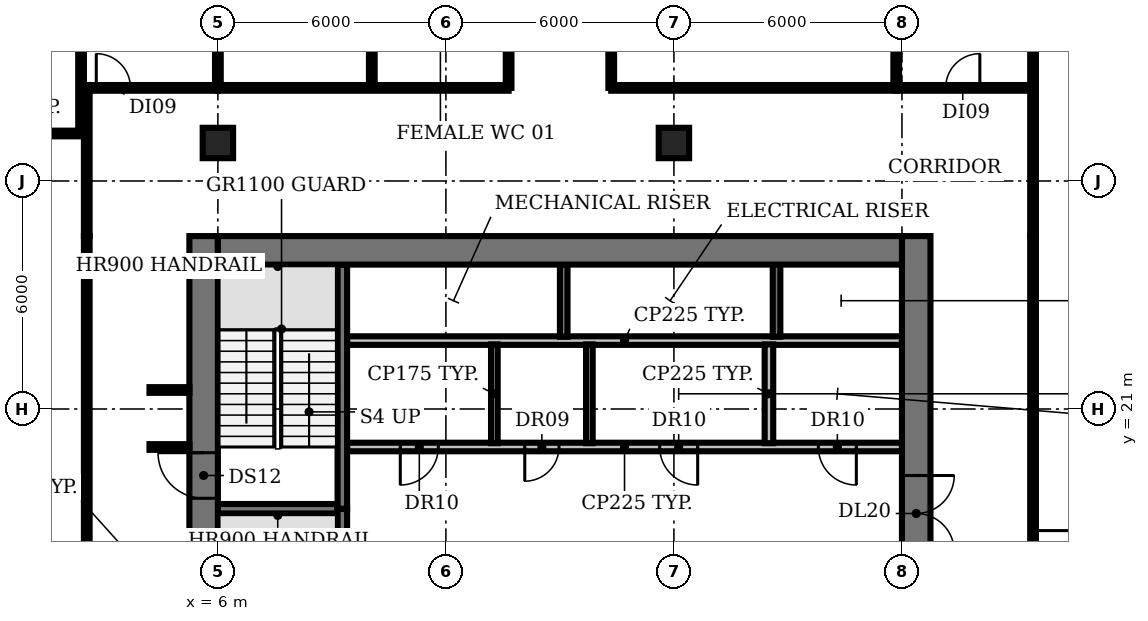
"""IFC4 building model, lengths in metres.
Left out: names, types, materials, properties, quantities, classifications, styles, units other than length and angle.
Written with IfcOpenShell. Run it as: python <this file> out.ifc"""

import sys

from ifc_helpers import new_model, si_unit, direction, frame, frame_2d, origin, origin_2d, place, context, subcontext, project, spatial, rectangle, extrude, element, fill, save


model = new_model("IFC4")
c1 = context("Model", 3, precision=1e-05, world=origin(), true_north=direction((0.0, 1.0)))
c2 = subcontext(c1, "Body", "Model", "MODEL_VIEW")
j1 = project(units=[si_unit("LENGTHUNIT", "METRE"), si_unit("PLANEANGLEUNIT", "RADIAN")], contexts=[c1])
p1 = place(None, origin())
s1 = spatial("IfcSite", under=j1, at=p1, CompositionType="ELEMENT")
p2 = place(p1, origin())
s2 = spatial("IfcBuilding", under=s1, at=p2, CompositionType="ELEMENT")
p3 = place(p2, frame((0.0, 0.0, 121.4)))
s3 = spatial("IfcBuildingStorey", under=s2, at=p3, CompositionType="ELEMENT", Elevation=121.4)
for number, where, z_axis, x_axis in (
    (1, (6.0, 28.0, 0.0), (0.0, 0.0, 1.0), (1.0, 0.0, 0.0)),
    (2, (18.0, 28.0, 0.0), (0.0, 0.0, 1.0), (1.0, 0.0, 0.0)),
):
    element("IfcColumn", number, at=place(p3, frame(where, z_axis=z_axis, x_axis=x_axis)), inside=s3, PredefinedType="COLUMN", context=c2, shape_type="SweptSolid", body=[
        extrude(rectangle(XDim=0.8, YDim=0.8, at=origin_2d()), origin(), (0.0, 0.0, 1.0), 3.85),
    ])
p4 = place(p3, frame((6.0, 18.375, 0.0), z_axis=(0.0, 0.0, 1.0), x_axis=(1.0, 0.0, 0.0)))
e3 = element("IfcWall", 3, at=p4, inside=s3, PredefinedType="SHEAR", context=c2, shape_type="SweptSolid", body=[
    extrude(rectangle(XDim=3.15, YDim=0.25, at=frame_2d((1.575, 0.0))), origin(), (0.0, 0.0, 1.0), 3.85),
])
p5 = place(p3, frame((24.0, 20.0, 0.0), z_axis=(0.0, 0.0, 1.0), x_axis=(-1.0, 0.0, 0.0)))
e4 = element("IfcWall", 4, at=p5, inside=s3, PredefinedType="PARTITIONING", context=c2, shape_type="SweptSolid", body=[
    extrude(rectangle(XDim=14.6, YDim=0.225, at=frame_2d((7.3, 0.0))), origin(), (0.0, 0.0, 1.0), 3.85),
])
p6 = place(p5, frame((12.2, 0.0, 0.0)))
e5 = element("IfcOpeningElement", 5, at=p6, cuts=e4, PredefinedType="OPENING", context=c2, shape_type="SweptSolid", body=[
    extrude(rectangle(XDim=1.0, YDim=2.1, at=frame_2d((0.5, 1.05))), frame((0.0, 0.123, 0.0), z_axis=(0.0, -1.0, 0.0), x_axis=(1.0, 0.0, 0.0)), (0.0, 0.0, 1.0), 0.245),
])
p7 = place(p5, frame((9.025, 0.0, 0.0)))
e6 = element("IfcOpeningElement", 6, at=p7, cuts=e4, PredefinedType="OPENING", context=c2, shape_type="SweptSolid", body=[
    extrude(rectangle(XDim=0.9, YDim=2.1, at=frame_2d((0.45, 1.05))), frame((0.0, 0.123, 0.0), z_axis=(0.0, -1.0, 0.0), x_axis=(1.0, 0.0, 0.0)), (0.0, 0.0, 1.0), 0.245),
])
p8 = place(p5, frame((5.375, 0.0, 0.0)))
e7 = element("IfcOpeningElement", 7, at=p8, cuts=e4, PredefinedType="OPENING", context=c2, shape_type="SweptSolid", body=[
    extrude(rectangle(XDim=1.0, YDim=2.1, at=frame_2d((0.5, 1.05))), frame((0.0, 0.123, 0.0), z_axis=(0.0, -1.0, 0.0), x_axis=(1.0, 0.0, 0.0)), (0.0, 0.0, 1.0), 0.245),
])
p9 = place(p5, frame((1.2, 0.0, 0.0)))
e8 = element("IfcOpeningElement", 8, at=p9, cuts=e4, PredefinedType="OPENING", context=c2, shape_type="SweptSolid", body=[
    extrude(rectangle(XDim=1.0, YDim=2.1, at=frame_2d((0.5, 1.05))), frame((0.0, 0.123, 0.0), z_axis=(0.0, -1.0, 0.0), x_axis=(1.0, 0.0, 0.0)), (0.0, 0.0, 1.0), 0.245),
])
p10 = place(p3, frame((9.4, 22.8, 0.0), z_axis=(0.0, 0.0, 1.0), x_axis=(1.0, 0.0, 0.0)))
e9 = element("IfcWall", 9, at=p10, inside=s3, PredefinedType="PARTITIONING", context=c2, shape_type="SweptSolid", body=[
    extrude(rectangle(XDim=14.6, YDim=0.225, at=frame_2d((7.3, 0.0))), origin(), (0.0, 0.0, 1.0), 3.85),
])
p11 = place(p3, frame((9.275, 18.375, 0.0), z_axis=(0.0, 0.0, 1.0), x_axis=(0.0, -1.0, 0.0)))
e10 = element("IfcWall", 10, at=p11, inside=s3, PredefinedType="SHEAR", context=c2, shape_type="SweptSolid", body=[
    extrude(rectangle(XDim=6.55, YDim=0.25, at=frame_2d((3.275, 0.0))), origin(), (0.0, 0.0, 1.0), 3.85),
])
p12 = place(p11, frame((5.075, 0.0, 0.0)))
e11 = element("IfcOpeningElement", 11, at=p12, cuts=e10, PredefinedType="OPENING", context=c2, shape_type="SweptSolid", body=[
    extrude(rectangle(XDim=1.0, YDim=2.1, at=frame_2d((0.5, 1.05))), frame((0.0, 0.135, 0.0), z_axis=(0.0, -1.0, 0.0), x_axis=(1.0, 0.0, 0.0)), (0.0, 0.0, 1.0), 0.27),
])
p13 = place(p3, frame((9.275, 18.375, 0.0), z_axis=(0.0, 0.0, 1.0), x_axis=(0.0, 1.0, 0.0)))
e12 = element("IfcWall", 12, at=p13, inside=s3, PredefinedType="SHEAR", context=c2, shape_type="SweptSolid", body=[
    extrude(rectangle(XDim=6.425, YDim=0.25, at=frame_2d((3.212, 0.0))), origin(), (0.0, 0.0, 1.0), 3.85),
])
p14 = place(p3, frame((13.275, 20.1, 0.0), z_axis=(0.0, 0.0, 1.0), x_axis=(0.0, 1.0, 0.0)))
e13 = element("IfcWall", 13, at=p14, inside=s3, PredefinedType="PARTITIONING", context=c2, shape_type="SweptSolid", body=[
    extrude(rectangle(XDim=2.6, YDim=0.175, at=frame_2d((1.3, 0.0))), origin(), (0.0, 0.0, 1.0), 3.85),
])
p15 = place(p3, frame((15.1, 22.9, 0.0), z_axis=(0.0, 0.0, 1.0), x_axis=(0.0, 1.0, 0.0)))
e14 = element("IfcWall", 14, at=p15, inside=s3, PredefinedType="SHEAR", context=c2, shape_type="SweptSolid", body=[
    extrude(rectangle(XDim=1.9, YDim=0.2, at=frame_2d((0.95, 0.0))), origin(), (0.0, 0.0, 1.0), 3.85),
])
p16 = place(p3, frame((15.775, 20.1, 0.0), z_axis=(0.0, 0.0, 1.0), x_axis=(0.0, 1.0, 0.0)))
e15 = element("IfcWall", 15, at=p16, inside=s3, PredefinedType="PARTITIONING", context=c2, shape_type="SweptSolid", body=[
    extrude(rectangle(XDim=2.6, YDim=0.175, at=frame_2d((1.3, 0.0))), origin(), (0.0, 0.0, 1.0), 3.85),
])
p17 = place(p3, frame((20.5, 20.1, 0.0), z_axis=(0.0, 0.0, 1.0), x_axis=(0.0, 1.0, 0.0)))
e16 = element("IfcWall", 16, at=p17, inside=s3, PredefinedType="PARTITIONING", context=c2, shape_type="SweptSolid", body=[
    extrude(rectangle(XDim=2.6, YDim=0.225, at=frame_2d((1.3, 0.0))), origin(), (0.0, 0.0, 1.0), 3.85),
])
p18 = place(p3, frame((20.7, 22.9, 0.0), z_axis=(0.0, 0.0, 1.0), x_axis=(0.0, 1.0, 0.0)))
e17 = element("IfcWall", 17, at=p18, inside=s3, PredefinedType="SHEAR", context=c2, shape_type="SweptSolid", body=[
    extrude(rectangle(XDim=1.9, YDim=0.2, at=frame_2d((0.95, 0.0))), origin(), (0.0, 0.0, 1.0), 3.85),
])
p19 = place(p3, frame((5.625, 4.47, 0.0), z_axis=(0.0, 0.0, 1.0), x_axis=(0.0, 1.0, 0.0)))
e18 = element("IfcWall", 18, at=p19, inside=s3, PredefinedType="SHEAR", context=c2, shape_type="SweptSolid", body=[
    extrude(rectangle(XDim=21.08, YDim=0.75, at=frame_2d((10.54, 0.0))), origin(), (0.0, 0.0, 1.0), 3.85),
])
p20 = place(p19, frame((1.18, 0.0, 0.0)))
e19 = element("IfcOpeningElement", 19, at=p20, cuts=e18, PredefinedType="OPENING", context=c2, shape_type="SweptSolid", body=[
    extrude(rectangle(XDim=1.5, YDim=2.1, at=frame_2d((0.75, 1.05))), frame((0.0, 0.385, 0.0), z_axis=(0.0, -1.0, 0.0), x_axis=(1.0, 0.0, 0.0)), (0.0, 0.0, 1.0), 0.77),
])
p21 = place(p19, frame((7.63, 0.0, 0.0)))
e20 = element("IfcOpeningElement", 20, at=p21, cuts=e18, PredefinedType="OPENING", context=c2, shape_type="SweptSolid", body=[
    extrude(rectangle(XDim=1.2, YDim=2.1, at=frame_2d((0.6, 1.05))), frame((0.0, 0.385, 0.0), z_axis=(0.0, -1.0, 0.0), x_axis=(1.0, 0.0, 0.0)), (0.0, 0.0, 1.0), 0.77),
])
p22 = place(p19, frame((14.18, 0.0, 0.0)))
e21 = element("IfcOpeningElement", 21, at=p22, cuts=e18, PredefinedType="OPENING", context=c2, shape_type="SweptSolid", body=[
    extrude(rectangle(XDim=1.2, YDim=2.1, at=frame_2d((0.6, 1.05))), frame((0.0, 0.385, 0.0), z_axis=(0.0, -1.0, 0.0), x_axis=(1.0, 0.0, 0.0)), (0.0, 0.0, 1.0), 0.77),
])
p23 = place(p3, frame((24.375, 25.55, 0.0), z_axis=(0.0, 0.0, 1.0), x_axis=(0.0, -1.0, 0.0)))
e22 = element("IfcWall", 22, at=p23, inside=s3, PredefinedType="SHEAR", context=c2, shape_type="SweptSolid", body=[
    extrude(rectangle(XDim=21.13, YDim=0.75, at=frame_2d((10.565, 0.0))), origin(), (0.0, 0.0, 1.0), 3.85),
])
p24 = place(p23, frame((18.4, 0.0, 0.0)))
e23 = element("IfcOpeningElement", 23, at=p24, cuts=e22, PredefinedType="OPENING", context=c2, shape_type="SweptSolid", body=[
    extrude(rectangle(XDim=1.5, YDim=2.1, at=frame_2d((0.75, 1.05))), frame((0.0, 0.385, 0.0), z_axis=(0.0, -1.0, 0.0), x_axis=(1.0, 0.0, 0.0)), (0.0, 0.0, 1.0), 0.77),
])
p25 = place(p23, frame((12.3, 0.0, 0.0)))
e24 = element("IfcOpeningElement", 24, at=p25, cuts=e22, PredefinedType="OPENING", context=c2, shape_type="SweptSolid", body=[
    extrude(rectangle(XDim=0.9, YDim=2.1, at=frame_2d((0.45, 1.05))), frame((0.0, 0.385, 0.0), z_axis=(0.0, -1.0, 0.0), x_axis=(1.0, 0.0, 0.0)), (0.0, 0.0, 1.0), 0.77),
])
p26 = place(p23, frame((6.3, 0.0, 0.0)))
e25 = element("IfcOpeningElement", 25, at=p26, cuts=e22, PredefinedType="OPENING", context=c2, shape_type="SweptSolid", body=[
    extrude(rectangle(XDim=2.0, YDim=2.1, at=frame_2d((1.0, 1.05))), frame((0.0, 0.385, 0.0), z_axis=(0.0, -1.0, 0.0), x_axis=(1.0, 0.0, 0.0)), (0.0, 0.0, 1.0), 0.77),
])
p27 = place(p3, frame((6.0, 25.175, 0.0), z_axis=(0.0, 0.0, 1.0), x_axis=(1.0, 0.0, 0.0)))
e26 = element("IfcWall", 26, at=p27, inside=s3, PredefinedType="SHEAR", context=c2, shape_type="SweptSolid", body=[
    extrude(rectangle(XDim=18.0, YDim=0.75, at=frame_2d((9.0, 0.0))), origin(), (0.0, 0.0, 1.0), 3.85),
])
p28 = place(p3, frame((-1.22, 28.25, 0.0), z_axis=(0.0, 0.0, 1.0), x_axis=(1.0, 0.0, 0.0)))
e27 = element("IfcWall", 27, at=p28, inside=s3, PredefinedType="PARTITIONING", context=c2, shape_type="SweptSolid", body=[
    extrude(rectangle(XDim=3.62, YDim=0.15, at=frame_2d((1.81, 0.0))), origin(), (0.0, 0.0, 1.0), 2.83),
])
p29 = place(p3, frame((2.4, 28.25, 0.0), z_axis=(0.0, 0.0, 1.0), x_axis=(0.0, 1.0, 0.0)))
e28 = element("IfcWall", 28, at=p29, inside=s3, PredefinedType="PARTITIONING", context=c2, shape_type="SweptSolid", body=[
    extrude(rectangle(XDim=6.0, YDim=0.15, at=frame_2d((3.0, 0.0))), origin(), (0.0, 0.0, 1.0), 2.83),
])
p30 = place(p3, frame((2.55, 6.08, 0.0), z_axis=(0.0, 0.0, 1.0), x_axis=(0.0, 1.0, 0.0)))
e29 = element("IfcWall", 29, at=p30, inside=s3, PredefinedType="PARTITIONING", context=c2, shape_type="SweptSolid", body=[
    extrude(rectangle(XDim=19.47, YDim=0.15, at=frame_2d((9.735, 0.0))), origin(), (0.0, 0.0, 1.0), 2.83),
])
p31 = place(p30, frame((7.57, 0.0, 0.0)))
e30 = element("IfcOpeningElement", 30, at=p31, cuts=e29, PredefinedType="OPENING", context=c2, shape_type="SweptSolid", body=[
    extrude(rectangle(XDim=1.2, YDim=2.1, at=frame_2d((0.6, 1.05))), frame((0.0, 0.085, 0.0), z_axis=(0.0, -1.0, 0.0), x_axis=(1.0, 0.0, 0.0)), (0.0, 0.0, 1.0), 0.17),
])
p32 = place(p3, frame((2.55, 25.55, 0.0), z_axis=(0.0, 0.0, 1.0), x_axis=(0.0, 1.0, 0.0)))
e31 = element("IfcWall", 31, at=p32, inside=s3, PredefinedType="PARTITIONING", context=c2, shape_type="SweptSolid", body=[
    extrude(rectangle(XDim=3.9, YDim=0.15, at=frame_2d((1.95, 0.0))), origin(), (0.0, 0.0, 1.0), 2.83),
])
p33 = place(p3, frame((2.55, 29.45, 0.0), z_axis=(0.0, 0.0, 1.0), x_axis=(1.0, 0.0, 0.0)))
e32 = element("IfcWall", 32, at=p33, inside=s3, PredefinedType="PARTITIONING", context=c2, shape_type="SweptSolid", body=[
    extrude(rectangle(XDim=3.45, YDim=0.15, at=frame_2d((1.725, 0.0))), origin(), (0.0, 0.0, 1.0), 2.83),
])
p34 = place(p33, frame((0.25, 0.0, 0.0)))
e33 = element("IfcOpeningElement", 33, at=p34, cuts=e32, PredefinedType="OPENING", context=c2, shape_type="SweptSolid", body=[
    extrude(rectangle(XDim=0.9, YDim=2.1, at=frame_2d((0.45, 1.05))), frame((0.0, 0.085, 0.0), z_axis=(0.0, -1.0, 0.0), x_axis=(1.0, 0.0, 0.0)), (0.0, 0.0, 1.0), 0.17),
])
for number, where, z_axis, x_axis in (
    (34, (4.2, 20.0, 0.0), (0.0, 0.0, 1.0), (1.0, 0.0, 0.0)),
    (35, (4.2, 21.5, 0.0), (0.0, 0.0, 1.0), (1.0, 0.0, 0.0)),
):
    element("IfcWall", number, at=place(p3, frame(where, z_axis=z_axis, x_axis=x_axis)), inside=s3, PredefinedType="PARTITIONING", context=c2, shape_type="SweptSolid", body=[
        extrude(rectangle(XDim=1.05, YDim=0.15, at=frame_2d((0.525, 0.0))), origin(), (0.0, 0.0, 1.0), 2.83),
    ])
p35 = place(p3, frame((6.0, 29.45, 0.0), z_axis=(0.0, 0.0, 1.0), x_axis=(0.0, 1.0, 0.0)))
e36 = element("IfcWall", 36, at=p35, inside=s3, PredefinedType="PARTITIONING", context=c2, shape_type="SweptSolid", body=[
    extrude(rectangle(XDim=4.8, YDim=0.15, at=frame_2d((2.4, 0.0))), origin(), (0.0, 0.0, 1.0), 2.83),
])
p36 = place(p3, frame((6.0, 29.45, 0.0), z_axis=(0.0, 0.0, 1.0), x_axis=(1.0, 0.0, 0.0)))
e37 = element("IfcWall", 37, at=p36, inside=s3, PredefinedType="PARTITIONING", context=c2, shape_type="SweptSolid", body=[
    extrude(rectangle(XDim=7.65, YDim=0.15, at=frame_2d((3.825, 0.0))), origin(), (0.0, 0.0, 1.0), 2.83),
])
p37 = place(p3, frame((10.05, 29.45, 0.0), z_axis=(0.0, 0.0, 1.0), x_axis=(0.0, 1.0, 0.0)))
e38 = element("IfcWall", 38, at=p37, inside=s3, PredefinedType="PARTITIONING", context=c2, shape_type="SweptSolid", body=[
    extrude(rectangle(XDim=4.8, YDim=0.15, at=frame_2d((2.4, 0.0))), origin(), (0.0, 0.0, 1.0), 2.83),
])
p38 = place(p3, frame((13.65, 29.45, 0.0), z_axis=(0.0, 0.0, 1.0), x_axis=(0.0, 1.0, 0.0)))
e39 = element("IfcWall", 39, at=p38, inside=s3, PredefinedType="PARTITIONING", context=c2, shape_type="SweptSolid", body=[
    extrude(rectangle(XDim=4.8, YDim=0.15, at=frame_2d((2.4, 0.0))), origin(), (0.0, 0.0, 1.0), 2.83),
])
p39 = place(p38, frame((1.9, 0.0, 0.0)))
e40 = element("IfcOpeningElement", 40, at=p39, cuts=e39, PredefinedType="OPENING", context=c2, shape_type="SweptSolid", body=[
    extrude(rectangle(XDim=0.9, YDim=2.1, at=frame_2d((0.45, 1.05))), frame((0.0, 0.085, 0.0), z_axis=(0.0, -1.0, 0.0), x_axis=(1.0, 0.0, 0.0)), (0.0, 0.0, 1.0), 0.17),
])
p40 = place(p3, frame((16.35, 29.45, 0.0), z_axis=(0.0, 0.0, 1.0), x_axis=(0.0, 1.0, 0.0)))
e41 = element("IfcWall", 41, at=p40, inside=s3, PredefinedType="PARTITIONING", context=c2, shape_type="SweptSolid", body=[
    extrude(rectangle(XDim=4.8, YDim=0.15, at=frame_2d((2.4, 0.0))), origin(), (0.0, 0.0, 1.0), 2.83),
])
p41 = place(p3, frame((16.35, 29.45, 0.0), z_axis=(0.0, 0.0, 1.0), x_axis=(1.0, 0.0, 0.0)))
e42 = element("IfcWall", 42, at=p41, inside=s3, PredefinedType="PARTITIONING", context=c2, shape_type="SweptSolid", body=[
    extrude(rectangle(XDim=7.5, YDim=0.15, at=frame_2d((3.75, 0.0))), origin(), (0.0, 0.0, 1.0), 2.83),
])
p42 = place(p3, frame((23.85, 29.45, 0.0), z_axis=(0.0, 0.0, 1.0), x_axis=(0.0, 1.0, 0.0)))
e43 = element("IfcWall", 43, at=p42, inside=s3, PredefinedType="PARTITIONING", context=c2, shape_type="SweptSolid", body=[
    extrude(rectangle(XDim=4.8, YDim=0.15, at=frame_2d((2.4, 0.0))), origin(), (0.0, 0.0, 1.0), 2.83),
])
p43 = place(p3, frame((23.85, 29.45, 0.0), z_axis=(0.0, 0.0, 1.0), x_axis=(1.0, 0.0, 0.0)))
e44 = element("IfcWall", 44, at=p43, inside=s3, PredefinedType="PARTITIONING", context=c2, shape_type="SweptSolid", body=[
    extrude(rectangle(XDim=3.6, YDim=0.15, at=frame_2d((1.8, 0.0))), origin(), (0.0, 0.0, 1.0), 2.83),
])
p44 = place(p43, frame((1.3, 0.0, 0.0)))
e45 = element("IfcOpeningElement", 45, at=p44, cuts=e44, PredefinedType="OPENING", context=c2, shape_type="SweptSolid", body=[
    extrude(rectangle(XDim=0.9, YDim=2.1, at=frame_2d((0.45, 1.05))), frame((0.0, 0.085, 0.0), z_axis=(0.0, -1.0, 0.0), x_axis=(1.0, 0.0, 0.0)), (0.0, 0.0, 1.0), 0.17),
])
p45 = place(p3, frame((27.45, 25.55, 0.0), z_axis=(0.0, 0.0, 1.0), x_axis=(0.0, -1.0, 0.0)))
e46 = element("IfcWall", 46, at=p45, inside=s3, PredefinedType="PARTITIONING", context=c2, shape_type="SweptSolid", body=[
    extrude(rectangle(XDim=16.45, YDim=0.15, at=frame_2d((8.225, 0.0))), origin(), (0.0, 0.0, 1.0), 2.83),
])
p46 = place(p45, frame((7.75, 0.0, 0.0)))
e47 = element("IfcOpeningElement", 47, at=p46, cuts=e46, PredefinedType="OPENING", context=c2, shape_type="SweptSolid", body=[
    extrude(rectangle(XDim=1.0, YDim=2.1, at=frame_2d((0.5, 1.05))), frame((0.0, 0.085, 0.0), z_axis=(0.0, -1.0, 0.0), x_axis=(1.0, 0.0, 0.0)), (0.0, 0.0, 1.0), 0.17),
])
p47 = place(p3, frame((27.45, 25.55, 0.0), z_axis=(0.0, 0.0, 1.0), x_axis=(0.0, 1.0, 0.0)))
e48 = element("IfcWall", 48, at=p47, inside=s3, PredefinedType="PARTITIONING", context=c2, shape_type="SweptSolid", body=[
    extrude(rectangle(XDim=3.9, YDim=0.15, at=frame_2d((1.95, 0.0))), origin(), (0.0, 0.0, 1.0), 2.83),
])
p48 = place(p3, frame((27.45, 29.45, 0.0), z_axis=(0.0, 0.0, 1.0), x_axis=(0.0, 1.0, 0.0)))
e49 = element("IfcWall", 49, at=p48, inside=s3, PredefinedType="PARTITIONING", context=c2, shape_type="SweptSolid", body=[
    extrude(rectangle(XDim=2.49, YDim=0.15, at=frame_2d((1.245, 0.0))), origin(), (0.0, 0.0, 1.0), 2.83),
])
p49 = place(p6, origin())
e50 = element("IfcDoor", 50, at=p49, inside=s3, OperationType="SINGLE_SWING_RIGHT", PredefinedType="DOOR", context=c2, shape_type="SweptSolid", body=[
    extrude(rectangle(XDim=1.0, YDim=2.1, at=frame_2d((0.5, 1.05))), frame((0.0, 0.025, 0.0), z_axis=(0.0, -1.0, 0.0), x_axis=(1.0, 0.0, 0.0)), (0.0, 0.0, 1.0), 0.05),
])
fill(e5, e50)
p50 = place(p7, origin())
e51 = element("IfcDoor", 51, at=p50, inside=s3, OperationType="SINGLE_SWING_RIGHT", PredefinedType="DOOR", context=c2, shape_type="SweptSolid", body=[
    extrude(rectangle(XDim=0.9, YDim=2.1, at=frame_2d((0.45, 1.05))), frame((0.0, 0.025, 0.0), z_axis=(0.0, -1.0, 0.0), x_axis=(1.0, 0.0, 0.0)), (0.0, 0.0, 1.0), 0.05),
])
fill(e6, e51)
p51 = place(p8, origin())
e52 = element("IfcDoor", 52, at=p51, inside=s3, OperationType="SINGLE_SWING_LEFT", PredefinedType="DOOR", context=c2, shape_type="SweptSolid", body=[
    extrude(rectangle(XDim=1.0, YDim=2.1, at=frame_2d((0.5, 1.05))), frame((0.0, 0.025, 0.0), z_axis=(0.0, -1.0, 0.0), x_axis=(1.0, 0.0, 0.0)), (0.0, 0.0, 1.0), 0.05),
])
fill(e7, e52)
p52 = place(p9, origin())
e53 = element("IfcDoor", 53, at=p52, inside=s3, OperationType="SINGLE_SWING_LEFT", PredefinedType="DOOR", context=c2, shape_type="SweptSolid", body=[
    extrude(rectangle(XDim=1.0, YDim=2.1, at=frame_2d((0.5, 1.05))), frame((0.0, 0.025, 0.0), z_axis=(0.0, -1.0, 0.0), x_axis=(1.0, 0.0, 0.0)), (0.0, 0.0, 1.0), 0.05),
])
fill(e8, e53)
p53 = place(p22, origin())
e54 = element("IfcDoor", 54, at=p53, inside=s3, OperationType="SINGLE_SWING_RIGHT", PredefinedType="DOOR", context=c2, shape_type="SweptSolid", body=[
    extrude(rectangle(XDim=1.2, YDim=2.1, at=frame_2d((0.6, 1.05))), frame((0.0, 0.025, 0.0), z_axis=(0.0, -1.0, 0.0), x_axis=(1.0, 0.0, 0.0)), (0.0, 0.0, 1.0), 0.05),
])
fill(e21, e54)
p54 = place(p26, origin())
e55 = element("IfcDoor", 55, at=p54, inside=s3, OperationType="DOUBLE_DOOR_SINGLE_SWING", PredefinedType="DOOR", context=c2, shape_type="SweptSolid", body=[
    extrude(rectangle(XDim=2.0, YDim=2.1, at=frame_2d((1.0, 1.05))), frame((0.0, 0.025, 0.0), z_axis=(0.0, -1.0, 0.0), x_axis=(1.0, 0.0, 0.0)), (0.0, 0.0, 1.0), 0.05),
])
fill(e25, e55)
p55 = place(p34, origin())
e56 = element("IfcDoor", 56, at=p55, inside=s3, OperationType="SINGLE_SWING_LEFT", PredefinedType="DOOR", context=c2, shape_type="SweptSolid", body=[
    extrude(rectangle(XDim=0.9, YDim=2.1, at=frame_2d((0.45, 1.05))), frame((0.0, 0.025, 0.0), z_axis=(0.0, -1.0, 0.0), x_axis=(1.0, 0.0, 0.0)), (0.0, 0.0, 1.0), 0.05),
])
fill(e33, e56)
p56 = place(p44, origin())
e57 = element("IfcDoor", 57, at=p56, inside=s3, OperationType="SINGLE_SWING_RIGHT", PredefinedType="DOOR", context=c2, shape_type="SweptSolid", body=[
    extrude(rectangle(XDim=0.9, YDim=2.1, at=frame_2d((0.45, 1.05))), frame((0.0, 0.025, 0.0), z_axis=(0.0, -1.0, 0.0), x_axis=(1.0, 0.0, 0.0)), (0.0, 0.0, 1.0), 0.05),
])
fill(e45, e57)
p57 = place(p46, origin())
e58 = element("IfcDoor", 58, at=p57, inside=s3, OperationType="SINGLE_SWING_LEFT", PredefinedType="DOOR", context=c2, shape_type="SweptSolid", body=[
    extrude(rectangle(XDim=1.0, YDim=2.1, at=frame_2d((0.5, 1.05))), frame((0.0, 0.025, 0.0), z_axis=(0.0, -1.0, 0.0), x_axis=(1.0, 0.0, 0.0)), (0.0, 0.0, 1.0), 0.05),
])
fill(e47, e58)
save(model, sys.argv[1])
